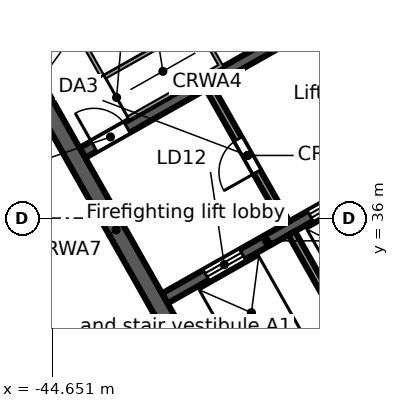
"""IFC4 building model, lengths in metres.
Left out: names, types, materials, properties, quantities, classifications, styles, units other than length and angle.
Written with IfcOpenShell. Run it as: python <this file> out.ifc"""

import sys

from ifc_helpers import new_model, si_unit, direction, frame, frame_2d, origin, place, context, subcontext, project, spatial, rectangle, extrude, element, fill, save


model = new_model("IFC4")
c1 = context("Model", 3, precision=1e-05, world=origin(), true_north=direction((0.0, 1.0)))
c2 = subcontext(c1, "Body", "Model", "MODEL_VIEW")
j1 = project(units=[si_unit("LENGTHUNIT", "METRE"), si_unit("PLANEANGLEUNIT", "RADIAN")], contexts=[c1])
p1 = place(None, origin())
s1 = spatial("IfcSite", under=j1, at=p1, CompositionType="ELEMENT")
p2 = place(p1, origin())
s2 = spatial("IfcBuilding", under=s1, at=p2, CompositionType="ELEMENT")
p3 = place(p2, frame((0.0, 0.0, 250.4)))
s3 = spatial("IfcBuildingStorey", under=s2, at=p3, CompositionType="ELEMENT", Elevation=250.4)
p4 = place(p3, frame((-0.046, 47.974, 0.0), z_axis=(0.0, 0.0, 1.0), x_axis=(-0.870356579543, -0.492421998337, 0.0)))
e1 = element("IfcWall", 1, at=p4, inside=s3, PredefinedType="STANDARD", context=c2, shape_type="SweptSolid", body=[
    extrude(rectangle(XDim=43.754, YDim=0.25, at=frame_2d((21.877, 0.0))), origin(), (0.0, 0.0, 1.0), 3.62),
])
p5 = place(p4, frame((41.061, 0.0, 0.8)))
e2 = element("IfcOpeningElement", 2, at=p5, cuts=e1, PredefinedType="OPENING", context=c2, shape_type="SweptSolid", body=[
    extrude(rectangle(XDim=2.4, YDim=2.2, at=frame_2d((1.2, 1.1))), frame((0.0, 0.135, 0.0), z_axis=(0.0, -1.0, 0.0), x_axis=(1.0, 0.0, 0.0)), (0.0, 0.0, 1.0), 0.27),
])
p6 = place(p4, frame((38.443, 0.0, 0.0)))
e3 = element("IfcOpeningElement", 3, at=p6, cuts=e1, PredefinedType="OPENING", context=c2, shape_type="SweptSolid", body=[
    extrude(rectangle(XDim=1.8, YDim=2.4, at=frame_2d((0.9, 1.2))), frame((0.0, 0.135, 0.0), z_axis=(0.0, -1.0, 0.0), x_axis=(1.0, 0.0, 0.0)), (0.0, 0.0, 1.0), 0.27),
])
p7 = place(p4, frame((35.225, 0.0, 0.8)))
e4 = element("IfcOpeningElement", 4, at=p7, cuts=e1, PredefinedType="OPENING", context=c2, shape_type="SweptSolid", body=[
    extrude(rectangle(XDim=2.4, YDim=2.2, at=frame_2d((1.2, 1.1))), frame((0.0, 0.135, 0.0), z_axis=(0.0, -1.0, 0.0), x_axis=(1.0, 0.0, 0.0)), (0.0, 0.0, 1.0), 0.27),
])
p8 = place(p4, frame((32.307, 0.0, 0.8)))
e5 = element("IfcOpeningElement", 5, at=p8, cuts=e1, PredefinedType="OPENING", context=c2, shape_type="SweptSolid", body=[
    extrude(rectangle(XDim=2.4, YDim=2.2, at=frame_2d((1.2, 1.1))), frame((0.0, 0.135, 0.0), z_axis=(0.0, -1.0, 0.0), x_axis=(1.0, 0.0, 0.0)), (0.0, 0.0, 1.0), 0.27),
])
p9 = place(p4, frame((29.688, 0.0, 0.0)))
e6 = element("IfcOpeningElement", 6, at=p9, cuts=e1, PredefinedType="OPENING", context=c2, shape_type="SweptSolid", body=[
    extrude(rectangle(XDim=1.8, YDim=2.4, at=frame_2d((0.9, 1.2))), frame((0.0, 0.135, 0.0), z_axis=(0.0, -1.0, 0.0), x_axis=(1.0, 0.0, 0.0)), (0.0, 0.0, 1.0), 0.27),
])
p10 = place(p4, frame((26.47, 0.0, 0.8)))
e7 = element("IfcOpeningElement", 7, at=p10, cuts=e1, PredefinedType="OPENING", context=c2, shape_type="SweptSolid", body=[
    extrude(rectangle(XDim=2.4, YDim=2.2, at=frame_2d((1.2, 1.1))), frame((0.0, 0.135, 0.0), z_axis=(0.0, -1.0, 0.0), x_axis=(1.0, 0.0, 0.0)), (0.0, 0.0, 1.0), 0.27),
])
p11 = place(p4, frame((23.552, 0.0, 0.8)))
e8 = element("IfcOpeningElement", 8, at=p11, cuts=e1, PredefinedType="OPENING", context=c2, shape_type="SweptSolid", body=[
    extrude(rectangle(XDim=2.4, YDim=2.2, at=frame_2d((1.2, 1.1))), frame((0.0, 0.135, 0.0), z_axis=(0.0, -1.0, 0.0), x_axis=(1.0, 0.0, 0.0)), (0.0, 0.0, 1.0), 0.27),
])
p12 = place(p4, frame((20.934, 0.0, 0.0)))
e9 = element("IfcOpeningElement", 9, at=p12, cuts=e1, PredefinedType="OPENING", context=c2, shape_type="SweptSolid", body=[
    extrude(rectangle(XDim=1.8, YDim=2.4, at=frame_2d((0.9, 1.2))), frame((0.0, 0.135, 0.0), z_axis=(0.0, -1.0, 0.0), x_axis=(1.0, 0.0, 0.0)), (0.0, 0.0, 1.0), 0.27),
])
p13 = place(p4, frame((17.716, 0.0, 0.8)))
e10 = element("IfcOpeningElement", 10, at=p13, cuts=e1, PredefinedType="OPENING", context=c2, shape_type="SweptSolid", body=[
    extrude(rectangle(XDim=2.4, YDim=2.2, at=frame_2d((1.2, 1.1))), frame((0.0, 0.135, 0.0), z_axis=(0.0, -1.0, 0.0), x_axis=(1.0, 0.0, 0.0)), (0.0, 0.0, 1.0), 0.27),
])
p14 = place(p4, frame((14.798, 0.0, 0.8)))
e11 = element("IfcOpeningElement", 11, at=p14, cuts=e1, PredefinedType="OPENING", context=c2, shape_type="SweptSolid", body=[
    extrude(rectangle(XDim=2.4, YDim=2.2, at=frame_2d((1.2, 1.1))), frame((0.0, 0.135, 0.0), z_axis=(0.0, -1.0, 0.0), x_axis=(1.0, 0.0, 0.0)), (0.0, 0.0, 1.0), 0.27),
])
p15 = place(p4, frame((12.179, 0.0, 0.0)))
e12 = element("IfcOpeningElement", 12, at=p15, cuts=e1, PredefinedType="OPENING", context=c2, shape_type="SweptSolid", body=[
    extrude(rectangle(XDim=1.8, YDim=2.4, at=frame_2d((0.9, 1.2))), frame((0.0, 0.135, 0.0), z_axis=(0.0, -1.0, 0.0), x_axis=(1.0, 0.0, 0.0)), (0.0, 0.0, 1.0), 0.27),
])
p16 = place(p4, frame((8.961, 0.0, 0.8)))
e13 = element("IfcOpeningElement", 13, at=p16, cuts=e1, PredefinedType="OPENING", context=c2, shape_type="SweptSolid", body=[
    extrude(rectangle(XDim=2.4, YDim=2.2, at=frame_2d((1.2, 1.1))), frame((0.0, 0.135, 0.0), z_axis=(0.0, -1.0, 0.0), x_axis=(1.0, 0.0, 0.0)), (0.0, 0.0, 1.0), 0.27),
])
p17 = place(p4, frame((6.043, 0.0, 0.8)))
e14 = element("IfcOpeningElement", 14, at=p17, cuts=e1, PredefinedType="OPENING", context=c2, shape_type="SweptSolid", body=[
    extrude(rectangle(XDim=2.4, YDim=2.2, at=frame_2d((1.2, 1.1))), frame((0.0, 0.135, 0.0), z_axis=(0.0, -1.0, 0.0), x_axis=(1.0, 0.0, 0.0)), (0.0, 0.0, 1.0), 0.27),
])
p18 = place(p4, frame((3.425, 0.0, 0.0)))
e15 = element("IfcOpeningElement", 15, at=p18, cuts=e1, PredefinedType="OPENING", context=c2, shape_type="SweptSolid", body=[
    extrude(rectangle(XDim=1.8, YDim=2.4, at=frame_2d((0.9, 1.2))), frame((0.0, 0.135, 0.0), z_axis=(0.0, -1.0, 0.0), x_axis=(1.0, 0.0, 0.0)), (0.0, 0.0, 1.0), 0.27),
])
p19 = place(p4, frame((0.207, 0.0, 0.8)))
e16 = element("IfcOpeningElement", 16, at=p19, cuts=e1, PredefinedType="OPENING", context=c2, shape_type="SweptSolid", body=[
    extrude(rectangle(XDim=2.4, YDim=2.2, at=frame_2d((1.2, 1.1))), frame((0.0, 0.135, 0.0), z_axis=(0.0, -1.0, 0.0), x_axis=(1.0, 0.0, 0.0)), (0.0, 0.0, 1.0), 0.27),
])
p20 = place(p3, frame((-58.732, 38.771, 0.0), z_axis=(0.0, 0.0, 1.0), x_axis=(0.870354824205, 0.492425100887, 0.0)))
e17 = element("IfcWall", 17, at=p20, inside=s3, PredefinedType="STANDARD", context=c2, shape_type="SweptSolid", body=[
    extrude(rectangle(XDim=64.006, YDim=0.25, at=frame_2d((32.003, 0.0))), origin(), (0.0, 0.0, 1.0), 3.62),
])
p21 = place(p20, frame((61.259, 0.0, 0.8)))
e18 = element("IfcOpeningElement", 18, at=p21, cuts=e17, PredefinedType="OPENING", context=c2, shape_type="SweptSolid", body=[
    extrude(rectangle(XDim=2.4, YDim=2.2, at=frame_2d((1.2, 1.1))), frame((0.0, 0.135, 0.0), z_axis=(0.0, -1.0, 0.0), x_axis=(1.0, 0.0, 0.0)), (0.0, 0.0, 1.0), 0.27),
])
p22 = place(p20, frame((58.216, 0.0, 0.8)))
e19 = element("IfcOpeningElement", 19, at=p22, cuts=e17, PredefinedType="OPENING", context=c2, shape_type="SweptSolid", body=[
    extrude(rectangle(XDim=2.4, YDim=2.2, at=frame_2d((1.2, 1.1))), frame((0.0, 0.135, 0.0), z_axis=(0.0, -1.0, 0.0), x_axis=(1.0, 0.0, 0.0)), (0.0, 0.0, 1.0), 0.27),
])
p23 = place(p20, frame((55.173, 0.0, 0.8)))
e20 = element("IfcOpeningElement", 20, at=p23, cuts=e17, PredefinedType="OPENING", context=c2, shape_type="SweptSolid", body=[
    extrude(rectangle(XDim=2.4, YDim=2.2, at=frame_2d((1.2, 1.1))), frame((0.0, 0.135, 0.0), z_axis=(0.0, -1.0, 0.0), x_axis=(1.0, 0.0, 0.0)), (0.0, 0.0, 1.0), 0.27),
])
p24 = place(p20, frame((52.129, 0.0, 0.8)))
e21 = element("IfcOpeningElement", 21, at=p24, cuts=e17, PredefinedType="OPENING", context=c2, shape_type="SweptSolid", body=[
    extrude(rectangle(XDim=2.4, YDim=2.2, at=frame_2d((1.2, 1.1))), frame((0.0, 0.135, 0.0), z_axis=(0.0, -1.0, 0.0), x_axis=(1.0, 0.0, 0.0)), (0.0, 0.0, 1.0), 0.27),
])
p25 = place(p20, frame((49.086, 0.0, 0.8)))
e22 = element("IfcOpeningElement", 22, at=p25, cuts=e17, PredefinedType="OPENING", context=c2, shape_type="SweptSolid", body=[
    extrude(rectangle(XDim=2.4, YDim=2.2, at=frame_2d((1.2, 1.1))), frame((0.0, 0.135, 0.0), z_axis=(0.0, -1.0, 0.0), x_axis=(1.0, 0.0, 0.0)), (0.0, 0.0, 1.0), 0.27),
])
p26 = place(p20, frame((46.043, 0.0, 0.8)))
e23 = element("IfcOpeningElement", 23, at=p26, cuts=e17, PredefinedType="OPENING", context=c2, shape_type="SweptSolid", body=[
    extrude(rectangle(XDim=2.4, YDim=2.2, at=frame_2d((1.2, 1.1))), frame((0.0, 0.135, 0.0), z_axis=(0.0, -1.0, 0.0), x_axis=(1.0, 0.0, 0.0)), (0.0, 0.0, 1.0), 0.27),
])
p27 = place(p20, frame((43.0, 0.0, 0.8)))
e24 = element("IfcOpeningElement", 24, at=p27, cuts=e17, PredefinedType="OPENING", context=c2, shape_type="SweptSolid", body=[
    extrude(rectangle(XDim=2.4, YDim=2.2, at=frame_2d((1.2, 1.1))), frame((0.0, 0.135, 0.0), z_axis=(0.0, -1.0, 0.0), x_axis=(1.0, 0.0, 0.0)), (0.0, 0.0, 1.0), 0.27),
])
p28 = place(p20, frame((39.956, 0.0, 0.8)))
e25 = element("IfcOpeningElement", 25, at=p28, cuts=e17, PredefinedType="OPENING", context=c2, shape_type="SweptSolid", body=[
    extrude(rectangle(XDim=2.4, YDim=2.2, at=frame_2d((1.2, 1.1))), frame((0.0, 0.135, 0.0), z_axis=(0.0, -1.0, 0.0), x_axis=(1.0, 0.0, 0.0)), (0.0, 0.0, 1.0), 0.27),
])
p29 = place(p20, frame((36.913, 0.0, 0.8)))
e26 = element("IfcOpeningElement", 26, at=p29, cuts=e17, PredefinedType="OPENING", context=c2, shape_type="SweptSolid", body=[
    extrude(rectangle(XDim=2.4, YDim=2.2, at=frame_2d((1.2, 1.1))), frame((0.0, 0.135, 0.0), z_axis=(0.0, -1.0, 0.0), x_axis=(1.0, 0.0, 0.0)), (0.0, 0.0, 1.0), 0.27),
])
p30 = place(p20, frame((33.87, 0.0, 0.8)))
e27 = element("IfcOpeningElement", 27, at=p30, cuts=e17, PredefinedType="OPENING", context=c2, shape_type="SweptSolid", body=[
    extrude(rectangle(XDim=2.4, YDim=2.2, at=frame_2d((1.2, 1.1))), frame((0.0, 0.135, 0.0), z_axis=(0.0, -1.0, 0.0), x_axis=(1.0, 0.0, 0.0)), (0.0, 0.0, 1.0), 0.27),
])
p31 = place(p20, frame((30.826, 0.0, 0.8)))
e28 = element("IfcOpeningElement", 28, at=p31, cuts=e17, PredefinedType="OPENING", context=c2, shape_type="SweptSolid", body=[
    extrude(rectangle(XDim=2.4, YDim=2.2, at=frame_2d((1.2, 1.1))), frame((0.0, 0.135, 0.0), z_axis=(0.0, -1.0, 0.0), x_axis=(1.0, 0.0, 0.0)), (0.0, 0.0, 1.0), 0.27),
])
p32 = place(p20, frame((27.783, 0.0, 0.8)))
e29 = element("IfcOpeningElement", 29, at=p32, cuts=e17, PredefinedType="OPENING", context=c2, shape_type="SweptSolid", body=[
    extrude(rectangle(XDim=2.4, YDim=2.2, at=frame_2d((1.2, 1.1))), frame((0.0, 0.135, 0.0), z_axis=(0.0, -1.0, 0.0), x_axis=(1.0, 0.0, 0.0)), (0.0, 0.0, 1.0), 0.27),
])
p33 = place(p20, frame((24.74, 0.0, 0.8)))
e30 = element("IfcOpeningElement", 30, at=p33, cuts=e17, PredefinedType="OPENING", context=c2, shape_type="SweptSolid", body=[
    extrude(rectangle(XDim=2.4, YDim=2.2, at=frame_2d((1.2, 1.1))), frame((0.0, 0.135, 0.0), z_axis=(0.0, -1.0, 0.0), x_axis=(1.0, 0.0, 0.0)), (0.0, 0.0, 1.0), 0.27),
])
p34 = place(p20, frame((21.696, 0.0, 0.8)))
e31 = element("IfcOpeningElement", 31, at=p34, cuts=e17, PredefinedType="OPENING", context=c2, shape_type="SweptSolid", body=[
    extrude(rectangle(XDim=2.4, YDim=2.2, at=frame_2d((1.2, 1.1))), frame((0.0, 0.135, 0.0), z_axis=(0.0, -1.0, 0.0), x_axis=(1.0, 0.0, 0.0)), (0.0, 0.0, 1.0), 0.27),
])
p35 = place(p20, frame((18.653, 0.0, 0.8)))
e32 = element("IfcOpeningElement", 32, at=p35, cuts=e17, PredefinedType="OPENING", context=c2, shape_type="SweptSolid", body=[
    extrude(rectangle(XDim=2.4, YDim=2.2, at=frame_2d((1.2, 1.1))), frame((0.0, 0.135, 0.0), z_axis=(0.0, -1.0, 0.0), x_axis=(1.0, 0.0, 0.0)), (0.0, 0.0, 1.0), 0.27),
])
p36 = place(p20, frame((15.61, 0.0, 0.8)))
e33 = element("IfcOpeningElement", 33, at=p36, cuts=e17, PredefinedType="OPENING", context=c2, shape_type="SweptSolid", body=[
    extrude(rectangle(XDim=2.4, YDim=2.2, at=frame_2d((1.2, 1.1))), frame((0.0, 0.135, 0.0), z_axis=(0.0, -1.0, 0.0), x_axis=(1.0, 0.0, 0.0)), (0.0, 0.0, 1.0), 0.27),
])
p37 = place(p20, frame((12.567, 0.0, 0.8)))
e34 = element("IfcOpeningElement", 34, at=p37, cuts=e17, PredefinedType="OPENING", context=c2, shape_type="SweptSolid", body=[
    extrude(rectangle(XDim=2.4, YDim=2.2, at=frame_2d((1.2, 1.1))), frame((0.0, 0.135, 0.0), z_axis=(0.0, -1.0, 0.0), x_axis=(1.0, 0.0, 0.0)), (0.0, 0.0, 1.0), 0.27),
])
p38 = place(p20, frame((9.523, 0.0, 0.8)))
e35 = element("IfcOpeningElement", 35, at=p38, cuts=e17, PredefinedType="OPENING", context=c2, shape_type="SweptSolid", body=[
    extrude(rectangle(XDim=2.4, YDim=2.2, at=frame_2d((1.2, 1.1))), frame((0.0, 0.135, 0.0), z_axis=(0.0, -1.0, 0.0), x_axis=(1.0, 0.0, 0.0)), (0.0, 0.0, 1.0), 0.27),
])
p39 = place(p20, frame((6.48, 0.0, 0.8)))
e36 = element("IfcOpeningElement", 36, at=p39, cuts=e17, PredefinedType="OPENING", context=c2, shape_type="SweptSolid", body=[
    extrude(rectangle(XDim=2.4, YDim=2.2, at=frame_2d((1.2, 1.1))), frame((0.0, 0.135, 0.0), z_axis=(0.0, -1.0, 0.0), x_axis=(1.0, 0.0, 0.0)), (0.0, 0.0, 1.0), 0.27),
])
p40 = place(p20, frame((3.437, 0.0, 0.8)))
e37 = element("IfcOpeningElement", 37, at=p40, cuts=e17, PredefinedType="OPENING", context=c2, shape_type="SweptSolid", body=[
    extrude(rectangle(XDim=2.4, YDim=2.2, at=frame_2d((1.2, 1.1))), frame((0.0, 0.135, 0.0), z_axis=(0.0, -1.0, 0.0), x_axis=(1.0, 0.0, 0.0)), (0.0, 0.0, 1.0), 0.27),
])
p41 = place(p20, frame((0.393, 0.0, 0.8)))
e38 = element("IfcOpeningElement", 38, at=p41, cuts=e17, PredefinedType="OPENING", context=c2, shape_type="SweptSolid", body=[
    extrude(rectangle(XDim=2.4, YDim=2.2, at=frame_2d((1.2, 1.1))), frame((0.0, 0.135, 0.0), z_axis=(0.0, -1.0, 0.0), x_axis=(1.0, 0.0, 0.0)), (0.0, 0.0, 1.0), 0.27),
])
p42 = place(p3, frame((-44.115, 26.507, 0.0), z_axis=(0.0, 0.0, 1.0), x_axis=(-0.857166583633, 0.515039268311, 0.0)))
e39 = element("IfcWall", 39, at=p42, inside=s3, PredefinedType="STANDARD", context=c2, shape_type="SweptSolid", body=[
    extrude(rectangle(XDim=17.106, YDim=0.25, at=frame_2d((8.553, 0.0))), origin(), (0.0, 0.0, 1.0), 3.62),
])
p43 = place(p42, frame((14.417, 0.0, 0.8)))
e40 = element("IfcOpeningElement", 40, at=p43, cuts=e39, PredefinedType="OPENING", context=c2, shape_type="SweptSolid", body=[
    extrude(rectangle(XDim=2.4, YDim=2.2, at=frame_2d((1.2, 1.1))), frame((0.0, 0.135, 0.0), z_axis=(0.0, -1.0, 0.0), x_axis=(1.0, 0.0, 0.0)), (0.0, 0.0, 1.0), 0.27),
])
p44 = place(p42, frame((11.584, 0.0, 0.8)))
e41 = element("IfcOpeningElement", 41, at=p44, cuts=e39, PredefinedType="OPENING", context=c2, shape_type="SweptSolid", body=[
    extrude(rectangle(XDim=2.4, YDim=2.2, at=frame_2d((1.2, 1.1))), frame((0.0, 0.135, 0.0), z_axis=(0.0, -1.0, 0.0), x_axis=(1.0, 0.0, 0.0)), (0.0, 0.0, 1.0), 0.27),
])
p45 = place(p42, frame((8.75, 0.0, 0.8)))
e42 = element("IfcOpeningElement", 42, at=p45, cuts=e39, PredefinedType="OPENING", context=c2, shape_type="SweptSolid", body=[
    extrude(rectangle(XDim=2.4, YDim=2.2, at=frame_2d((1.2, 1.1))), frame((0.0, 0.135, 0.0), z_axis=(0.0, -1.0, 0.0), x_axis=(1.0, 0.0, 0.0)), (0.0, 0.0, 1.0), 0.27),
])
p46 = place(p42, frame((5.917, 0.0, 0.8)))
e43 = element("IfcOpeningElement", 43, at=p46, cuts=e39, PredefinedType="OPENING", context=c2, shape_type="SweptSolid", body=[
    extrude(rectangle(XDim=2.4, YDim=2.2, at=frame_2d((1.2, 1.1))), frame((0.0, 0.135, 0.0), z_axis=(0.0, -1.0, 0.0), x_axis=(1.0, 0.0, 0.0)), (0.0, 0.0, 1.0), 0.27),
])
p47 = place(p42, frame((3.084, 0.0, 0.8)))
e44 = element("IfcOpeningElement", 44, at=p47, cuts=e39, PredefinedType="OPENING", context=c2, shape_type="SweptSolid", body=[
    extrude(rectangle(XDim=2.4, YDim=2.2, at=frame_2d((1.2, 1.1))), frame((0.0, 0.135, 0.0), z_axis=(0.0, -1.0, 0.0), x_axis=(1.0, 0.0, 0.0)), (0.0, 0.0, 1.0), 0.27),
])
p48 = place(p42, frame((0.25, 0.0, 0.8)))
e45 = element("IfcOpeningElement", 45, at=p48, cuts=e39, PredefinedType="OPENING", context=c2, shape_type="SweptSolid", body=[
    extrude(rectangle(XDim=2.4, YDim=2.2, at=frame_2d((1.2, 1.1))), frame((0.0, 0.135, 0.0), z_axis=(0.0, -1.0, 0.0), x_axis=(1.0, 0.0, 0.0)), (0.0, 0.0, 1.0), 0.27),
])
p49 = place(p3, frame((-39.825, 29.684, 0.0), z_axis=(0.0, 0.0, 1.0), x_axis=(0.870353598469, 0.492427267353, 0.0)))
e46 = element("IfcWall", 46, at=p49, inside=s3, PredefinedType="SOLIDWALL", context=c2, shape_type="SweptSolid", body=[
    extrude(rectangle(XDim=17.0, YDim=0.45, at=frame_2d((8.5, 0.0))), origin(), (0.0, 0.0, 1.0), 3.62),
])
p50 = place(p49, frame((7.2, 0.0, 0.0)))
e47 = element("IfcOpeningElement", 47, at=p50, cuts=e46, PredefinedType="OPENING", context=c2, shape_type="SweptSolid", body=[
    extrude(rectangle(XDim=1.2, YDim=2.1, at=frame_2d((0.6, 1.05))), frame((0.0, 0.235, 0.0), z_axis=(0.0, -1.0, 0.0), x_axis=(1.0, 0.0, 0.0)), (0.0, 0.0, 1.0), 0.47),
])
p51 = place(p3, frame((-41.687, 33.887, 0.0), z_axis=(0.0, 0.0, 1.0), x_axis=(0.870355736587, 0.49242348826, 0.0)))
e48 = element("IfcWall", 48, at=p51, inside=s3, PredefinedType="SOLIDWALL", context=c2, shape_type="SweptSolid", body=[
    extrude(rectangle(XDim=6.15, YDim=0.3, at=frame_2d((3.075, 0.0))), origin(), (0.0, 0.0, 1.0), 3.62),
])
p52 = place(p51, frame((1.25, 0.0, 0.0)))
e49 = element("IfcOpeningElement", 49, at=p52, cuts=e48, PredefinedType="OPENING", context=c2, shape_type="SweptSolid", body=[
    extrude(rectangle(XDim=1.1, YDim=2.1, at=frame_2d((0.55, 1.05))), frame((0.0, 0.16, 0.0), z_axis=(0.0, -1.0, 0.0), x_axis=(1.0, 0.0, 0.0)), (0.0, 0.0, 1.0), 0.32),
])
p53 = place(p51, frame((4.4, 0.0, 0.0)))
e50 = element("IfcOpeningElement", 50, at=p53, cuts=e48, PredefinedType="OPENING", context=c2, shape_type="SweptSolid", body=[
    extrude(rectangle(XDim=1.1, YDim=2.1, at=frame_2d((0.55, 1.05))), frame((0.0, 0.16, 0.0), z_axis=(0.0, -1.0, 0.0), x_axis=(1.0, 0.0, 0.0)), (0.0, 0.0, 1.0), 0.32),
])
p54 = place(p3, frame((-43.853, 37.717, 0.0), z_axis=(0.0, 0.0, 1.0), x_axis=(0.870360409231, 0.492415229297, 0.0)))
e51 = element("IfcWall", 51, at=p54, inside=s3, PredefinedType="SOLIDWALL", context=c2, shape_type="SweptSolid", body=[
    extrude(rectangle(XDim=7.55, YDim=0.3, at=frame_2d((3.775, 0.0))), origin(), (0.0, 0.0, 1.0), 3.62),
])
p55 = place(p54, frame((0.35, 0.0, 0.0)))
e52 = element("IfcOpeningElement", 52, at=p55, cuts=e51, PredefinedType="OPENING", context=c2, shape_type="SweptSolid", body=[
    extrude(rectangle(XDim=1.0, YDim=2.1, at=frame_2d((0.5, 1.05))), frame((0.0, 0.16, 0.0), z_axis=(0.0, -1.0, 0.0), x_axis=(1.0, 0.0, 0.0)), (0.0, 0.0, 1.0), 0.32),
])
p56 = place(p3, frame((-46.191, 41.392, 0.0), z_axis=(0.0, 0.0, 1.0), x_axis=(0.492421378713, -0.870356930107, 0.0)))
e53 = element("IfcWall", 53, at=p56, inside=s3, PredefinedType="SOLIDWALL", context=c2, shape_type="SweptSolid", body=[
    extrude(rectangle(XDim=13.1, YDim=0.45, at=frame_2d((6.55, 0.0))), origin(), (0.0, 0.0, 1.0), 3.62),
])
p57 = place(p3, frame((-38.349, 35.603, 0.0), z_axis=(0.0, 0.0, 1.0), x_axis=(0.492409653846, -0.870363563575, 0.0)))
e54 = element("IfcWall", 54, at=p57, inside=s3, PredefinedType="SOLIDWALL", context=c2, shape_type="SweptSolid", body=[
    extrude(rectangle(XDim=4.2, YDim=0.2, at=frame_2d((2.1, 0.0))), origin(), (0.0, 0.0, 1.0), 3.62),
])
p58 = place(p3, frame((-40.516, 39.433, 0.0), z_axis=(0.0, 0.0, 1.0), x_axis=(0.492453559952, -0.87033872216, 0.0)))
e55 = element("IfcWall", 55, at=p58, inside=s3, PredefinedType="PARTITIONING", context=c2, shape_type="SweptSolid", body=[
    extrude(rectangle(XDim=4.1, YDim=0.2, at=frame_2d((2.05, 0.0))), origin(), (0.0, 0.0, 1.0), 3.62),
])
p59 = place(p58, frame((1.55, 0.0, 0.0)))
e56 = element("IfcOpeningElement", 56, at=p59, cuts=e55, PredefinedType="OPENING", context=c2, shape_type="SweptSolid", body=[
    extrude(rectangle(XDim=1.0, YDim=2.1, at=frame_2d((0.5, 1.05))), frame((0.0, 0.11, 0.0), z_axis=(0.0, -1.0, 0.0), x_axis=(1.0, 0.0, 0.0)), (0.0, 0.0, 1.0), 0.22),
])
p60 = place(p3, frame((-48.843, 29.494, 0.0), z_axis=(0.0, 0.0, 1.0), x_axis=(0.870384139606, 0.492373282705, 0.0)))
e57 = element("IfcWall", 57, at=p60, inside=s3, PredefinedType="PARTITIONING", context=c2, shape_type="SweptSolid", body=[
    extrude(rectangle(XDim=7.941, YDim=0.125, at=frame_2d((3.971, 0.0))), origin(), (0.0, 0.0, 1.0), 2.9),
])
p61 = place(p60, frame((3.45, 0.0, 0.0)))
e58 = element("IfcOpeningElement", 58, at=p61, cuts=e57, PredefinedType="OPENING", context=c2, shape_type="SweptSolid", body=[
    extrude(rectangle(XDim=0.9, YDim=2.1, at=frame_2d((0.45, 1.05))), frame((0.0, 0.073, 0.0), z_axis=(0.0, -1.0, 0.0), x_axis=(1.0, 0.0, 0.0)), (0.0, 0.0, 1.0), 0.145),
])
p62 = place(p52, origin())
e59 = element("IfcDoor", 59, at=p62, inside=s3, OperationType="DOUBLE_DOOR_SLIDING", PredefinedType="DOOR", context=c2, shape_type="SweptSolid", body=[
    extrude(rectangle(XDim=1.1, YDim=2.1, at=frame_2d((0.55, 1.05))), frame((0.0, 0.025, 0.0), z_axis=(0.0, -1.0, 0.0), x_axis=(1.0, 0.0, 0.0)), (0.0, 0.0, 1.0), 0.05),
])
fill(e49, e59)
p63 = place(p53, origin())
e60 = element("IfcDoor", 60, at=p63, inside=s3, OperationType="DOUBLE_DOOR_SLIDING", PredefinedType="DOOR", context=c2, shape_type="SweptSolid", body=[
    extrude(rectangle(XDim=1.1, YDim=2.1, at=frame_2d((0.55, 1.05))), frame((0.0, 0.025, 0.0), z_axis=(0.0, -1.0, 0.0), x_axis=(1.0, 0.0, 0.0)), (0.0, 0.0, 1.0), 0.05),
])
fill(e50, e60)
p64 = place(p55, origin())
e61 = element("IfcDoor", 61, at=p64, inside=s3, OperationType="SINGLE_SWING_LEFT", PredefinedType="DOOR", context=c2, shape_type="SweptSolid", body=[
    extrude(rectangle(XDim=1.0, YDim=2.1, at=frame_2d((0.5, 1.05))), frame((0.0, 0.025, 0.0), z_axis=(0.0, -1.0, 0.0), x_axis=(1.0, 0.0, 0.0)), (0.0, 0.0, 1.0), 0.05),
])
fill(e52, e61)
p65 = place(p59, frame((1.0, 0.0, 0.0), z_axis=(0.0, 0.0, 1.0), x_axis=(-1.0, 0.0, 0.0)))
e62 = element("IfcDoor", 62, at=p65, inside=s3, OperationType="SINGLE_SWING_LEFT", PredefinedType="DOOR", context=c2, shape_type="SweptSolid", body=[
    extrude(rectangle(XDim=1.0, YDim=2.1, at=frame_2d((0.5, 1.05))), frame((0.0, 0.025, 0.0), z_axis=(0.0, -1.0, 0.0), x_axis=(1.0, 0.0, 0.0)), (0.0, 0.0, 1.0), 0.05),
])
fill(e56, e62)
save(model, sys.argv[1])
